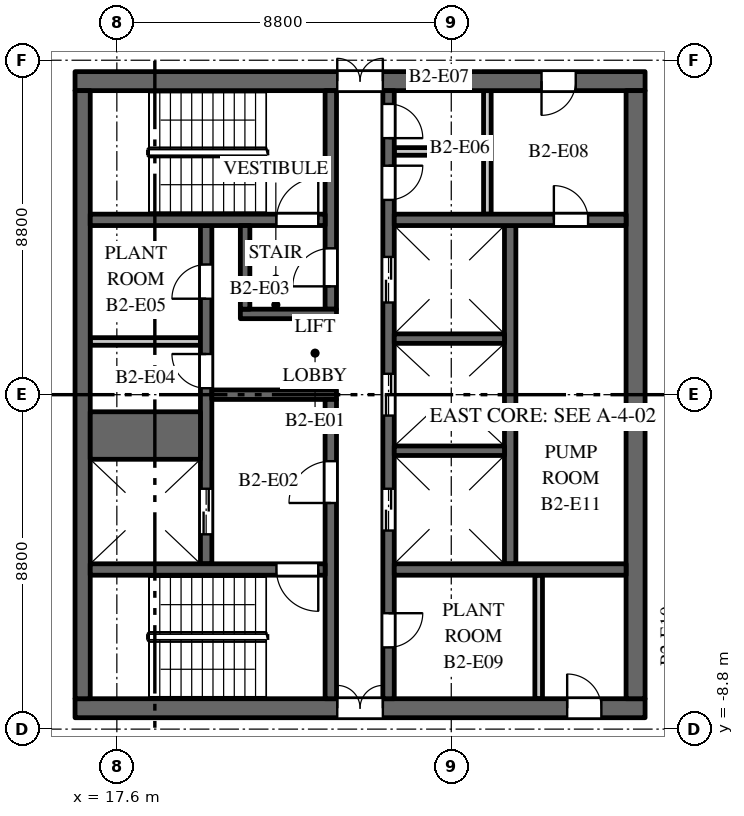
"""IFC4 building model, lengths in metres.
Left out: names, types, materials, properties, quantities, classifications, styles, units other than length and angle.
Written with IfcOpenShell. Run it as: python <this file> out.ifc"""

import sys

from ifc_helpers import new_model, si_unit, direction, frame, frame_2d, origin, place, context, subcontext, project, spatial, rectangle, extrude, element, fill, save


model = new_model("IFC4")
c1 = context("Model", 3, precision=1e-05, world=origin(), true_north=direction((0.0, 1.0)))
c2 = subcontext(c1, "Body", "Model", "MODEL_VIEW")
j1 = project(units=[si_unit("LENGTHUNIT", "METRE"), si_unit("PLANEANGLEUNIT", "RADIAN")], contexts=[c1])
p1 = place(None, origin())
s1 = spatial("IfcSite", under=j1, at=p1, CompositionType="ELEMENT")
p2 = place(p1, origin())
s2 = spatial("IfcBuilding", under=s1, at=p2, CompositionType="ELEMENT")
p3 = place(p2, frame((0.0, 0.0, -8.4)))
s3 = spatial("IfcBuildingStorey", under=s2, at=p3, CompositionType="ELEMENT", Elevation=-8.4)
p4 = place(p3, frame((16.5, 8.25, 0.0), z_axis=(0.0, 0.0, 1.0), x_axis=(1.0, 0.0, 0.0)))
e1 = element("IfcWall", 1, at=p4, inside=s3, PredefinedType="SHEAR", context=c2, shape_type="SweptSolid", body=[
    extrude(rectangle(XDim=15.0, YDim=0.5, at=frame_2d((7.5, 0.0))), origin(), (0.0, 0.0, 1.0), 3.9),
])
p5 = place(p4, frame((6.9, 0.0, 0.0)))
e2 = element("IfcOpeningElement", 2, at=p5, cuts=e1, PredefinedType="OPENING", context=c2, shape_type="SweptSolid", body=[
    extrude(rectangle(XDim=1.2, YDim=2.1, at=frame_2d((0.6, 1.05))), frame((0.0, 0.26, 0.0), z_axis=(0.0, -1.0, 0.0), x_axis=(1.0, 0.0, 0.0)), (0.0, 0.0, 1.0), 0.52),
])
p6 = place(p4, frame((12.275, 0.0, 0.0)))
e3 = element("IfcOpeningElement", 3, at=p6, cuts=e1, PredefinedType="OPENING", context=c2, shape_type="SweptSolid", body=[
    extrude(rectangle(XDim=0.9, YDim=2.1, at=frame_2d((0.45, 1.05))), frame((0.0, 0.26, 0.0), z_axis=(0.0, -1.0, 0.0), x_axis=(1.0, 0.0, 0.0)), (0.0, 0.0, 1.0), 0.52),
])
p7 = place(p3, frame((16.5, -8.25, 0.0), z_axis=(0.0, 0.0, 1.0), x_axis=(1.0, 0.0, 0.0)))
e4 = element("IfcWall", 4, at=p7, inside=s3, PredefinedType="SHEAR", context=c2, shape_type="SweptSolid", body=[
    extrude(rectangle(XDim=15.0, YDim=0.5, at=frame_2d((7.5, 0.0))), origin(), (0.0, 0.0, 1.0), 3.9),
])
p8 = place(p7, frame((6.9, 0.0, 0.0)))
e5 = element("IfcOpeningElement", 5, at=p8, cuts=e4, PredefinedType="OPENING", context=c2, shape_type="SweptSolid", body=[
    extrude(rectangle(XDim=1.2, YDim=2.1, at=frame_2d((0.6, 1.05))), frame((0.0, 0.26, 0.0), z_axis=(0.0, -1.0, 0.0), x_axis=(1.0, 0.0, 0.0)), (0.0, 0.0, 1.0), 0.52),
])
p9 = place(p7, frame((12.95, 0.0, 0.0)))
e6 = element("IfcOpeningElement", 6, at=p9, cuts=e4, PredefinedType="OPENING", context=c2, shape_type="SweptSolid", body=[
    extrude(rectangle(XDim=0.9, YDim=2.1, at=frame_2d((0.45, 1.05))), frame((0.0, 0.26, 0.0), z_axis=(0.0, -1.0, 0.0), x_axis=(1.0, 0.0, 0.0)), (0.0, 0.0, 1.0), 0.52),
])
p10 = place(p3, frame((16.9, 1.4, 0.0), z_axis=(0.0, 0.0, 1.0), x_axis=(1.0, 0.0, 0.0)))
e7 = element("IfcWall", 7, at=p10, inside=s3, PredefinedType="PARTITIONING", context=c2, shape_type="SweptSolid", body=[
    extrude(rectangle(XDim=2.9, YDim=0.2, at=frame_2d((1.45, 0.0))), origin(), (0.0, 0.0, 1.0), 3.9),
])
p11 = place(p3, frame((27.95, -4.45, 0.0), z_axis=(0.0, 0.0, 1.0), x_axis=(0.0, 1.0, 0.0)))
e8 = element("IfcWall", 8, at=p11, inside=s3, PredefinedType="SHEAR", context=c2, shape_type="SweptSolid", body=[
    extrude(rectangle(XDim=8.9, YDim=0.3, at=frame_2d((4.45, 0.0))), origin(), (0.0, 0.0, 1.0), 3.9),
])
p12 = place(p3, frame((19.95, -4.45, 0.0), z_axis=(0.0, 0.0, 1.0), x_axis=(0.0, 1.0, 0.0)))
e9 = element("IfcWall", 9, at=p12, inside=s3, PredefinedType="SHEAR", context=c2, shape_type="SweptSolid", body=[
    extrude(rectangle(XDim=8.9, YDim=0.3, at=frame_2d((4.45, 0.0))), origin(), (0.0, 0.0, 1.0), 3.9),
])
p13 = place(p12, frame((0.775, 0.0, 0.0)))
e10 = element("IfcOpeningElement", 10, at=p13, cuts=e9, PredefinedType="OPENING", context=c2, shape_type="SweptSolid", body=[
    extrude(rectangle(XDim=1.2, YDim=2.1, at=frame_2d((0.6, 1.05))), frame((0.0, 0.16, 0.0), z_axis=(0.0, -1.0, 0.0), x_axis=(1.0, 0.0, 0.0)), (0.0, 0.0, 1.0), 0.32),
])
p14 = place(p12, frame((4.62, 0.0, 0.0)))
e11 = element("IfcOpeningElement", 11, at=p14, cuts=e9, PredefinedType="OPENING", context=c2, shape_type="SweptSolid", body=[
    extrude(rectangle(XDim=0.9, YDim=2.1, at=frame_2d((0.45, 1.05))), frame((0.0, 0.16, 0.0), z_axis=(0.0, -1.0, 0.0), x_axis=(1.0, 0.0, 0.0)), (0.0, 0.0, 1.0), 0.32),
])
p15 = place(p12, frame((6.975, 0.0, 0.0)))
e12 = element("IfcOpeningElement", 12, at=p15, cuts=e9, PredefinedType="OPENING", context=c2, shape_type="SweptSolid", body=[
    extrude(rectangle(XDim=0.9, YDim=2.1, at=frame_2d((0.45, 1.05))), frame((0.0, 0.16, 0.0), z_axis=(0.0, -1.0, 0.0), x_axis=(1.0, 0.0, 0.0)), (0.0, 0.0, 1.0), 0.32),
])
p16 = place(p3, frame((24.75, -8.0, 0.0), z_axis=(0.0, 0.0, 1.0), x_axis=(0.0, 1.0, 0.0)))
e13 = element("IfcWall", 13, at=p16, inside=s3, PredefinedType="SHEAR", context=c2, shape_type="SweptSolid", body=[
    extrude(rectangle(XDim=16.0, YDim=0.3, at=frame_2d((8.0, 0.0))), origin(), (0.0, 0.0, 1.0), 3.9),
])
p17 = place(p16, frame((4.425, 0.0, 0.0)))
e14 = element("IfcOpeningElement", 14, at=p17, cuts=e13, PredefinedType="OPENING", context=c2, shape_type="SweptSolid", body=[
    extrude(rectangle(XDim=1.1, YDim=2.1, at=frame_2d((0.55, 1.05))), frame((0.0, 0.16, 0.0), z_axis=(0.0, -1.0, 0.0), x_axis=(1.0, 0.0, 0.0)), (0.0, 0.0, 1.0), 0.32),
])
p18 = place(p16, frame((7.45, 0.0, 0.0)))
e15 = element("IfcOpeningElement", 15, at=p18, cuts=e13, PredefinedType="OPENING", context=c2, shape_type="SweptSolid", body=[
    extrude(rectangle(XDim=1.1, YDim=2.1, at=frame_2d((0.55, 1.05))), frame((0.0, 0.16, 0.0), z_axis=(0.0, -1.0, 0.0), x_axis=(1.0, 0.0, 0.0)), (0.0, 0.0, 1.0), 0.32),
])
p19 = place(p16, frame((10.425, 0.0, 0.0)))
e16 = element("IfcOpeningElement", 16, at=p19, cuts=e13, PredefinedType="OPENING", context=c2, shape_type="SweptSolid", body=[
    extrude(rectangle(XDim=1.2, YDim=2.1, at=frame_2d((0.6, 1.05))), frame((0.0, 0.16, 0.0), z_axis=(0.0, -1.0, 0.0), x_axis=(1.0, 0.0, 0.0)), (0.0, 0.0, 1.0), 0.32),
])
p20 = place(p16, frame((13.125, 0.0, 0.0)))
e17 = element("IfcOpeningElement", 17, at=p20, cuts=e13, PredefinedType="OPENING", context=c2, shape_type="SweptSolid", body=[
    extrude(rectangle(XDim=0.9, YDim=2.1, at=frame_2d((0.45, 1.05))), frame((0.0, 0.16, 0.0), z_axis=(0.0, -1.0, 0.0), x_axis=(1.0, 0.0, 0.0)), (0.0, 0.0, 1.0), 0.32),
])
p21 = place(p16, frame((14.75, 0.0, 0.0)))
e18 = element("IfcOpeningElement", 18, at=p21, cuts=e13, PredefinedType="OPENING", context=c2, shape_type="SweptSolid", body=[
    extrude(rectangle(XDim=0.9, YDim=2.1, at=frame_2d((0.45, 1.05))), frame((0.0, 0.16, 0.0), z_axis=(0.0, -1.0, 0.0), x_axis=(1.0, 0.0, 0.0)), (0.0, 0.0, 1.0), 0.32),
])
p22 = place(p16, frame((1.35, 0.0, 0.0)))
e19 = element("IfcOpeningElement", 19, at=p22, cuts=e13, PredefinedType="OPENING", context=c2, shape_type="SweptSolid", body=[
    extrude(rectangle(XDim=0.9, YDim=2.1, at=frame_2d((0.45, 1.05))), frame((0.0, 0.16, 0.0), z_axis=(0.0, -1.0, 0.0), x_axis=(1.0, 0.0, 0.0)), (0.0, 0.0, 1.0), 0.32),
])
p23 = place(p3, frame((20.1, 0.0, 0.0), z_axis=(0.0, 0.0, 1.0), x_axis=(1.0, 0.0, 0.0)))
e20 = element("IfcWall", 20, at=p23, inside=s3, PredefinedType="SHEAR", context=c2, shape_type="SweptSolid", body=[
    extrude(rectangle(XDim=3.28, YDim=0.25, at=frame_2d((1.64, 0.0))), origin(), (0.0, 0.0, 1.0), 3.9),
])
p24 = place(p3, frame((16.7, -8.0, 0.0), z_axis=(0.0, 0.0, 1.0), x_axis=(0.0, 1.0, 0.0)))
e21 = element("IfcWall", 21, at=p24, inside=s3, PredefinedType="SHEAR", context=c2, shape_type="SweptSolid", body=[
    extrude(rectangle(XDim=16.0, YDim=0.4, at=frame_2d((8.0, 0.0))), origin(), (0.0, 0.0, 1.0), 3.9),
])
p25 = place(p3, frame((31.25, -8.0, 0.0), z_axis=(0.0, 0.0, 1.0), x_axis=(0.0, 1.0, 0.0)))
e22 = element("IfcWall", 22, at=p25, inside=s3, PredefinedType="SHEAR", context=c2, shape_type="SweptSolid", body=[
    extrude(rectangle(XDim=16.0, YDim=0.5, at=frame_2d((8.0, 0.0))), origin(), (0.0, 0.0, 1.0), 3.9),
])
p26 = place(p3, frame((24.9, 4.6, 0.0), z_axis=(0.0, 0.0, 1.0), x_axis=(1.0, 0.0, 0.0)))
e23 = element("IfcWall", 23, at=p26, inside=s3, PredefinedType="SHEAR", context=c2, shape_type="SweptSolid", body=[
    extrude(rectangle(XDim=6.1, YDim=0.3, at=frame_2d((3.05, 0.0))), origin(), (0.0, 0.0, 1.0), 3.9),
])
p27 = place(p26, frame((4.2, 0.0, 0.0)))
e24 = element("IfcOpeningElement", 24, at=p27, cuts=e23, PredefinedType="OPENING", context=c2, shape_type="SweptSolid", body=[
    extrude(rectangle(XDim=0.9, YDim=2.1, at=frame_2d((0.45, 1.05))), frame((0.0, 0.16, 0.0), z_axis=(0.0, -1.0, 0.0), x_axis=(1.0, 0.0, 0.0)), (0.0, 0.0, 1.0), 0.32),
])
for number, where, z_axis, x_axis in (
    (25, (27.35, 4.75, 0.0), (0.0, 0.0, 1.0), (0.0, 1.0, 0.0)),
    (26, (28.7, -8.0, 0.0), (0.0, 0.0, 1.0), (0.0, 1.0, 0.0)),
):
    element("IfcWall", number, at=place(p3, frame(where, z_axis=z_axis, x_axis=x_axis)), inside=s3, PredefinedType="PARTITIONING", context=c2, shape_type="SweptSolid", body=[
        extrude(rectangle(XDim=3.25, YDim=0.2, at=frame_2d((1.625, 0.0))), origin(), (0.0, 0.0, 1.0), 3.9),
    ])
p28 = place(p3, frame((24.9, 6.4, 0.0), z_axis=(0.0, 0.0, 1.0), x_axis=(1.0, 0.0, 0.0)))
e27 = element("IfcWall", 27, at=p28, inside=s3, PredefinedType="PARTITIONING", context=c2, shape_type="SweptSolid", body=[
    extrude(rectangle(XDim=2.35, YDim=0.2, at=frame_2d((1.175, 0.0))), origin(), (0.0, 0.0, 1.0), 3.9),
])
p29 = place(p3, frame((24.9, -4.6, 0.0), z_axis=(0.0, 0.0, 1.0), x_axis=(1.0, 0.0, 0.0)))
e28 = element("IfcWall", 28, at=p29, inside=s3, PredefinedType="SHEAR", context=c2, shape_type="SweptSolid", body=[
    extrude(rectangle(XDim=6.1, YDim=0.3, at=frame_2d((3.05, 0.0))), origin(), (0.0, 0.0, 1.0), 3.9),
])
p30 = place(p3, frame((16.9, -1.075, 0.0), z_axis=(0.0, 0.0, 1.0), x_axis=(1.0, 0.0, 0.0)))
e29 = element("IfcWall", 29, at=p30, inside=s3, PredefinedType="SHEAR", context=c2, shape_type="SweptSolid", body=[
    extrude(rectangle(XDim=2.9, YDim=1.25, at=frame_2d((1.45, 0.0))), origin(), (0.0, 0.0, 1.0), 3.9),
])
for number, where, z_axis, x_axis in (
    (30, (24.9, -1.475, 0.0), (0.0, 0.0, 1.0), (1.0, 0.0, 0.0)),
    (31, (24.9, 1.475, 0.0), (0.0, 0.0, 1.0), (1.0, 0.0, 0.0)),
):
    element("IfcWall", number, at=place(p3, frame(where, z_axis=z_axis, x_axis=x_axis)), inside=s3, PredefinedType="SHEAR", context=c2, shape_type="SweptSolid", body=[
        extrude(rectangle(XDim=2.9, YDim=0.25, at=frame_2d((1.45, 0.0))), origin(), (0.0, 0.0, 1.0), 3.9),
    ])
p31 = place(p3, frame((23.23, 2.25, 0.0), z_axis=(0.0, 0.0, 1.0), x_axis=(0.0, 1.0, 0.0)))
e32 = element("IfcWall", 32, at=p31, inside=s3, PredefinedType="SHEAR", context=c2, shape_type="SweptSolid", body=[
    extrude(rectangle(XDim=5.75, YDim=0.3, at=frame_2d((2.875, 0.0))), origin(), (0.0, 0.0, 1.0), 3.9),
])
p32 = place(p31, frame((0.6, 0.0, 0.0)))
e33 = element("IfcOpeningElement", 33, at=p32, cuts=e32, PredefinedType="OPENING", context=c2, shape_type="SweptSolid", body=[
    extrude(rectangle(XDim=1.0, YDim=2.1, at=frame_2d((0.5, 1.05))), frame((0.0, 0.16, 0.0), z_axis=(0.0, -1.0, 0.0), x_axis=(1.0, 0.0, 0.0)), (0.0, 0.0, 1.0), 0.32),
])
p33 = place(p3, frame((23.23, -8.0, 0.0), z_axis=(0.0, 0.0, 1.0), x_axis=(0.0, 1.0, 0.0)))
e34 = element("IfcWall", 34, at=p33, inside=s3, PredefinedType="SHEAR", context=c2, shape_type="SweptSolid", body=[
    extrude(rectangle(XDim=7.875, YDim=0.3, at=frame_2d((3.938, 0.0))), origin(), (0.0, 0.0, 1.0), 3.9),
])
p34 = place(p33, frame((5.15, 0.0, 0.0)))
e35 = element("IfcOpeningElement", 35, at=p34, cuts=e34, PredefinedType="OPENING", context=c2, shape_type="SweptSolid", body=[
    extrude(rectangle(XDim=1.1, YDim=2.1, at=frame_2d((0.55, 1.05))), frame((0.0, 0.16, 0.0), z_axis=(0.0, -1.0, 0.0), x_axis=(1.0, 0.0, 0.0)), (0.0, 0.0, 1.0), 0.32),
])
p35 = place(p3, frame((16.9, 4.6, 0.0), z_axis=(0.0, 0.0, 1.0), x_axis=(1.0, 0.0, 0.0)))
e36 = element("IfcWall", 36, at=p35, inside=s3, PredefinedType="SHEAR", context=c2, shape_type="SweptSolid", body=[
    extrude(rectangle(XDim=6.18, YDim=0.3, at=frame_2d((3.09, 0.0))), origin(), (0.0, 0.0, 1.0), 3.9),
])
p36 = place(p35, frame((4.9, 0.0, 0.0)))
e37 = element("IfcOpeningElement", 37, at=p36, cuts=e36, PredefinedType="OPENING", context=c2, shape_type="SweptSolid", body=[
    extrude(rectangle(XDim=1.1, YDim=2.1, at=frame_2d((0.55, 1.05))), frame((0.0, 0.16, 0.0), z_axis=(0.0, -1.0, 0.0), x_axis=(1.0, 0.0, 0.0)), (0.0, 0.0, 1.0), 0.32),
])
p37 = place(p3, frame((16.9, -4.6, 0.0), z_axis=(0.0, 0.0, 1.0), x_axis=(1.0, 0.0, 0.0)))
e38 = element("IfcWall", 38, at=p37, inside=s3, PredefinedType="SHEAR", context=c2, shape_type="SweptSolid", body=[
    extrude(rectangle(XDim=6.18, YDim=0.3, at=frame_2d((3.09, 0.0))), origin(), (0.0, 0.0, 1.0), 3.9),
])
p38 = place(p37, frame((4.9, 0.0, 0.0)))
e39 = element("IfcOpeningElement", 39, at=p38, cuts=e38, PredefinedType="OPENING", context=c2, shape_type="SweptSolid", body=[
    extrude(rectangle(XDim=1.1, YDim=2.1, at=frame_2d((0.55, 1.05))), frame((0.0, 0.16, 0.0), z_axis=(0.0, -1.0, 0.0), x_axis=(1.0, 0.0, 0.0)), (0.0, 0.0, 1.0), 0.32),
])
p39 = place(p3, frame((20.85, 2.125, 0.0), z_axis=(0.0, 0.0, 1.0), x_axis=(1.0, 0.0, 0.0)))
e40 = element("IfcWall", 40, at=p39, inside=s3, PredefinedType="SHEAR", context=c2, shape_type="SweptSolid", body=[
    extrude(rectangle(XDim=2.53, YDim=0.25, at=frame_2d((1.265, 0.0))), origin(), (0.0, 0.0, 1.0), 3.9),
])
p40 = place(p3, frame((20.975, 2.25, 0.0), z_axis=(0.0, 0.0, 1.0), x_axis=(0.0, 1.0, 0.0)))
e41 = element("IfcWall", 41, at=p40, inside=s3, PredefinedType="SHEAR", context=c2, shape_type="SweptSolid", body=[
    extrude(rectangle(XDim=2.2, YDim=0.25, at=frame_2d((1.1, 0.0))), origin(), (0.0, 0.0, 1.0), 3.9),
])
p41 = place(p3, frame((33.069, 8.062, 0.0), z_axis=(0.0, 0.0, 1.0), x_axis=(-0.462265314279, 0.886741664305, 0.0)))
e42 = element("IfcWall", 42, at=p41, inside=s3, PredefinedType="SOLIDWALL", context=c2, shape_type="SweptSolid", body=[
    extrude(rectangle(XDim=4.135, YDim=0.25, at=frame_2d((2.067, 0.0))), origin(), (0.0, 0.0, 1.0), 3.0),
])
p42 = place(p3, frame((31.157, -11.729, 0.0), z_axis=(0.0, 0.0, 1.0), x_axis=(0.462265314279, 0.886741664305, 0.0)))
e43 = element("IfcWall", 43, at=p42, inside=s3, PredefinedType="SOLIDWALL", context=c2, shape_type="SweptSolid", body=[
    extrude(rectangle(XDim=4.135, YDim=0.25, at=frame_2d((2.067, 0.0))), origin(), (0.0, 0.0, 1.0), 3.0),
])
p43 = place(p42, frame((1.467, 0.0, 0.0)))
e44 = element("IfcOpeningElement", 44, at=p43, cuts=e43, PredefinedType="OPENING", context=c2, shape_type="SweptSolid", body=[
    extrude(rectangle(XDim=1.2, YDim=2.1, at=frame_2d((0.6, 1.05))), frame((0.0, 0.135, 0.0), z_axis=(0.0, -1.0, 0.0), x_axis=(1.0, 0.0, 0.0)), (0.0, 0.0, 1.0), 0.27),
])
p44 = place(p13, origin())
e45 = element("IfcDoor", 45, at=p44, inside=s3, OperationType="DOUBLE_DOOR_SLIDING", PredefinedType="DOOR", context=c2, shape_type="SweptSolid", body=[
    extrude(rectangle(XDim=1.2, YDim=2.1, at=frame_2d((0.6, 1.05))), frame((0.0, 0.025, 0.0), z_axis=(0.0, -1.0, 0.0), x_axis=(1.0, 0.0, 0.0)), (0.0, 0.0, 1.0), 0.05),
])
fill(e10, e45)
p45 = place(p17, origin())
e46 = element("IfcDoor", 46, at=p45, inside=s3, OperationType="DOUBLE_DOOR_SLIDING", PredefinedType="DOOR", context=c2, shape_type="SweptSolid", body=[
    extrude(rectangle(XDim=1.1, YDim=2.1, at=frame_2d((0.55, 1.05))), frame((0.0, 0.025, 0.0), z_axis=(0.0, -1.0, 0.0), x_axis=(1.0, 0.0, 0.0)), (0.0, 0.0, 1.0), 0.05),
])
fill(e14, e46)
p46 = place(p18, origin())
e47 = element("IfcDoor", 47, at=p46, inside=s3, OperationType="DOUBLE_DOOR_SLIDING", PredefinedType="DOOR", context=c2, shape_type="SweptSolid", body=[
    extrude(rectangle(XDim=1.1, YDim=2.1, at=frame_2d((0.55, 1.05))), frame((0.0, 0.025, 0.0), z_axis=(0.0, -1.0, 0.0), x_axis=(1.0, 0.0, 0.0)), (0.0, 0.0, 1.0), 0.05),
])
fill(e15, e47)
p47 = place(p19, origin())
e48 = element("IfcDoor", 48, at=p47, inside=s3, OperationType="DOUBLE_DOOR_SLIDING", PredefinedType="DOOR", context=c2, shape_type="SweptSolid", body=[
    extrude(rectangle(XDim=1.2, YDim=2.1, at=frame_2d((0.6, 1.05))), frame((0.0, 0.025, 0.0), z_axis=(0.0, -1.0, 0.0), x_axis=(1.0, 0.0, 0.0)), (0.0, 0.0, 1.0), 0.05),
])
fill(e16, e48)
p48 = place(p36, origin())
e49 = element("IfcDoor", 49, at=p48, inside=s3, OperationType="SINGLE_SWING_LEFT", PredefinedType="DOOR", context=c2, shape_type="SweptSolid", body=[
    extrude(rectangle(XDim=1.1, YDim=2.1, at=frame_2d((0.55, 1.05))), frame((0.0, 0.025, 0.0), z_axis=(0.0, -1.0, 0.0), x_axis=(1.0, 0.0, 0.0)), (0.0, 0.0, 1.0), 0.05),
])
fill(e37, e49)
p49 = place(p38, origin())
e50 = element("IfcDoor", 50, at=p49, inside=s3, OperationType="SINGLE_SWING_RIGHT", PredefinedType="DOOR", context=c2, shape_type="SweptSolid", body=[
    extrude(rectangle(XDim=1.1, YDim=2.1, at=frame_2d((0.55, 1.05))), frame((0.0, 0.025, 0.0), z_axis=(0.0, -1.0, 0.0), x_axis=(1.0, 0.0, 0.0)), (0.0, 0.0, 1.0), 0.05),
])
fill(e39, e50)
p50 = place(p34, origin())
e51 = element("IfcDoor", 51, at=p50, inside=s3, OperationType="SINGLE_SWING_RIGHT", PredefinedType="DOOR", context=c2, shape_type="SweptSolid", body=[
    extrude(rectangle(XDim=1.1, YDim=2.1, at=frame_2d((0.55, 1.05))), frame((0.0, 0.025, 0.0), z_axis=(0.0, -1.0, 0.0), x_axis=(1.0, 0.0, 0.0)), (0.0, 0.0, 1.0), 0.05),
])
fill(e35, e51)
p51 = place(p32, origin())
e52 = element("IfcDoor", 52, at=p51, inside=s3, OperationType="SINGLE_SWING_RIGHT", PredefinedType="DOOR", context=c2, shape_type="SweptSolid", body=[
    extrude(rectangle(XDim=1.0, YDim=2.1, at=frame_2d((0.5, 1.05))), frame((0.0, 0.025, 0.0), z_axis=(0.0, -1.0, 0.0), x_axis=(1.0, 0.0, 0.0)), (0.0, 0.0, 1.0), 0.05),
])
fill(e33, e52)
p52 = place(p5, origin())
e53 = element("IfcDoor", 53, at=p52, inside=s3, OperationType="DOUBLE_DOOR_DOUBLE_SWING", PredefinedType="DOOR", context=c2, shape_type="SweptSolid", body=[
    extrude(rectangle(XDim=1.2, YDim=2.1, at=frame_2d((0.6, 1.05))), frame((0.0, 0.025, 0.0), z_axis=(0.0, -1.0, 0.0), x_axis=(1.0, 0.0, 0.0)), (0.0, 0.0, 1.0), 0.05),
])
fill(e2, e53)
p53 = place(p8, origin())
e54 = element("IfcDoor", 54, at=p53, inside=s3, OperationType="DOUBLE_DOOR_DOUBLE_SWING", PredefinedType="DOOR", context=c2, shape_type="SweptSolid", body=[
    extrude(rectangle(XDim=1.2, YDim=2.1, at=frame_2d((0.6, 1.05))), frame((0.0, 0.025, 0.0), z_axis=(0.0, -1.0, 0.0), x_axis=(1.0, 0.0, 0.0)), (0.0, 0.0, 1.0), 0.05),
])
fill(e5, e54)
p54 = place(p14, origin())
e55 = element("IfcDoor", 55, at=p54, inside=s3, OperationType="SINGLE_SWING_LEFT", PredefinedType="DOOR", context=c2, shape_type="SweptSolid", body=[
    extrude(rectangle(XDim=0.9, YDim=2.1, at=frame_2d((0.45, 1.05))), frame((0.0, 0.025, 0.0), z_axis=(0.0, -1.0, 0.0), x_axis=(1.0, 0.0, 0.0)), (0.0, 0.0, 1.0), 0.05),
])
fill(e11, e55)
p55 = place(p15, origin())
e56 = element("IfcDoor", 56, at=p55, inside=s3, OperationType="SINGLE_SWING_RIGHT", PredefinedType="DOOR", context=c2, shape_type="SweptSolid", body=[
    extrude(rectangle(XDim=0.9, YDim=2.1, at=frame_2d((0.45, 1.05))), frame((0.0, 0.025, 0.0), z_axis=(0.0, -1.0, 0.0), x_axis=(1.0, 0.0, 0.0)), (0.0, 0.0, 1.0), 0.05),
])
fill(e12, e56)
p56 = place(p20, origin())
e57 = element("IfcDoor", 57, at=p56, inside=s3, OperationType="SINGLE_SWING_RIGHT", PredefinedType="DOOR", context=c2, shape_type="SweptSolid", body=[
    extrude(rectangle(XDim=0.9, YDim=2.1, at=frame_2d((0.45, 1.05))), frame((0.0, 0.025, 0.0), z_axis=(0.0, -1.0, 0.0), x_axis=(1.0, 0.0, 0.0)), (0.0, 0.0, 1.0), 0.05),
])
fill(e17, e57)
p57 = place(p21, origin())
e58 = element("IfcDoor", 58, at=p57, inside=s3, OperationType="SINGLE_SWING_LEFT", PredefinedType="DOOR", context=c2, shape_type="SweptSolid", body=[
    extrude(rectangle(XDim=0.9, YDim=2.1, at=frame_2d((0.45, 1.05))), frame((0.0, 0.025, 0.0), z_axis=(0.0, -1.0, 0.0), x_axis=(1.0, 0.0, 0.0)), (0.0, 0.0, 1.0), 0.05),
])
fill(e18, e58)
p58 = place(p6, origin())
e59 = element("IfcDoor", 59, at=p58, inside=s3, OperationType="SINGLE_SWING_LEFT", PredefinedType="DOOR", context=c2, shape_type="SweptSolid", body=[
    extrude(rectangle(XDim=0.9, YDim=2.1, at=frame_2d((0.45, 1.05))), frame((0.0, 0.025, 0.0), z_axis=(0.0, -1.0, 0.0), x_axis=(1.0, 0.0, 0.0)), (0.0, 0.0, 1.0), 0.05),
])
fill(e3, e59)
p59 = place(p22, origin())
e60 = element("IfcDoor", 60, at=p59, inside=s3, OperationType="SINGLE_SWING_RIGHT", PredefinedType="DOOR", context=c2, shape_type="SweptSolid", body=[
    extrude(rectangle(XDim=0.9, YDim=2.1, at=frame_2d((0.45, 1.05))), frame((0.0, 0.025, 0.0), z_axis=(0.0, -1.0, 0.0), x_axis=(1.0, 0.0, 0.0)), (0.0, 0.0, 1.0), 0.05),
])
fill(e19, e60)
p60 = place(p9, origin())
e61 = element("IfcDoor", 61, at=p60, inside=s3, OperationType="SINGLE_SWING_RIGHT", PredefinedType="DOOR", context=c2, shape_type="SweptSolid", body=[
    extrude(rectangle(XDim=0.9, YDim=2.1, at=frame_2d((0.45, 1.05))), frame((0.0, 0.025, 0.0), z_axis=(0.0, -1.0, 0.0), x_axis=(1.0, 0.0, 0.0)), (0.0, 0.0, 1.0), 0.05),
])
fill(e6, e61)
p61 = place(p27, origin())
e62 = element("IfcDoor", 62, at=p61, inside=s3, OperationType="SINGLE_SWING_RIGHT", PredefinedType="DOOR", context=c2, shape_type="SweptSolid", body=[
    extrude(rectangle(XDim=0.9, YDim=2.1, at=frame_2d((0.45, 1.05))), frame((0.0, 0.025, 0.0), z_axis=(0.0, -1.0, 0.0), x_axis=(1.0, 0.0, 0.0)), (0.0, 0.0, 1.0), 0.05),
])
fill(e24, e62)
save(model, sys.argv[1])
